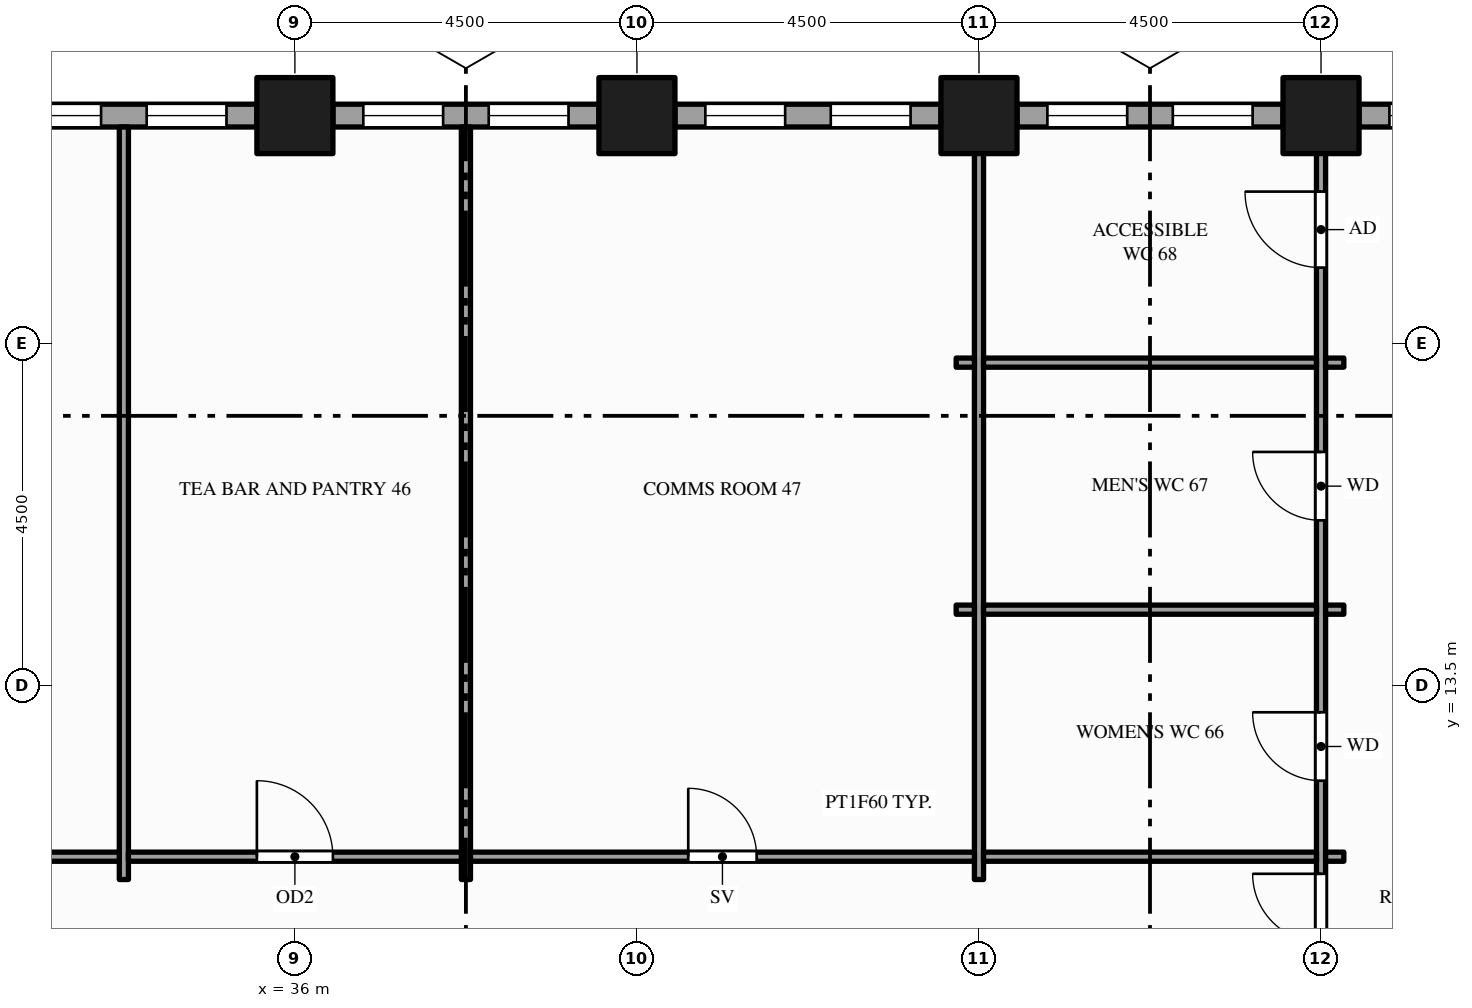
"""IFC4 building model, lengths in metres.
Left out: names, types, materials, properties, quantities, classifications, styles, units other than length and angle.
Written with IfcOpenShell. Run it as: python <this file> out.ifc"""

import sys

from ifc_helpers import new_model, si_unit, direction, frame, frame_2d, origin, origin_2d, place, context, subcontext, project, spatial, rectangle, hollow_rectangle, extrude, element, fill, save


model = new_model("IFC4")
c1 = context("Model", 3, precision=1e-05, world=origin(), true_north=direction((0.0, 1.0)))
c2 = subcontext(c1, "Body", "Model", "MODEL_VIEW")
j1 = project(units=[si_unit("LENGTHUNIT", "METRE"), si_unit("PLANEANGLEUNIT", "RADIAN")], contexts=[c1])
p1 = place(None, origin())
s1 = spatial("IfcSite", under=j1, at=p1, CompositionType="ELEMENT")
p2 = place(p1, origin())
s2 = spatial("IfcBuilding", under=s1, at=p2, CompositionType="ELEMENT")
p3 = place(p2, frame((0.0, 0.0, 95.0)))
s3 = spatial("IfcBuildingStorey", under=s2, at=p3, CompositionType="ELEMENT", Elevation=95.0)
for number, where, z_axis, x_axis in (
    (1, (36.0, 21.0, -0.15), (0.0, 0.0, 1.0), (1.0, 0.0, 0.0)),
    (2, (40.5, 21.0, -0.15), (0.0, 0.0, 1.0), (1.0, 0.0, 0.0)),
    (3, (45.0, 21.0, -0.15), (0.0, 0.0, 1.0), (1.0, 0.0, 0.0)),
    (4, (49.5, 21.0, -0.15), (0.0, 0.0, 1.0), (1.0, 0.0, 0.0)),
):
    element("IfcColumn", number, at=place(p3, frame(where, z_axis=z_axis, x_axis=x_axis)), inside=s3, PredefinedType="COLUMN", context=c2, shape_type="SweptSolid", body=[
        extrude(hollow_rectangle(XDim=1.0, YDim=1.0, WallThickness=0.05, at=origin_2d()), origin(), (0.0, 0.0, 1.0), 4.0),
    ])
p4 = place(p3, frame((54.0, 21.0, 0.0), z_axis=(0.0, 0.0, 1.0), x_axis=(-1.0, 0.0, 0.0)))
e5 = element("IfcWall", 5, at=p4, inside=s3, PredefinedType="STANDARD", context=c2, shape_type="SweptSolid", body=[
    extrude(rectangle(XDim=4.0, YDim=0.3, at=frame_2d((2.0, 0.0))), origin(), (0.0, 0.0, 1.0), 3.154),
])
p5 = place(p4, frame((0.4, 0.0, 0.9)))
e6 = element("IfcOpeningElement", 6, at=p5, cuts=e5, PredefinedType="OPENING", context=c2, shape_type="SweptSolid", body=[
    extrude(rectangle(XDim=1.55, YDim=2.0, at=frame_2d((0.775, 1.0))), frame((0.0, 0.16, 0.0), z_axis=(0.0, -1.0, 0.0), x_axis=(1.0, 0.0, 0.0)), (0.0, 0.0, 1.0), 0.32),
])
p6 = place(p4, frame((2.55, 0.0, 0.9)))
e7 = element("IfcOpeningElement", 7, at=p6, cuts=e5, PredefinedType="OPENING", context=c2, shape_type="SweptSolid", body=[
    extrude(rectangle(XDim=1.05, YDim=2.0, at=frame_2d((0.525, 1.0))), frame((0.0, 0.16, 0.0), z_axis=(0.0, -1.0, 0.0), x_axis=(1.0, 0.0, 0.0)), (0.0, 0.0, 1.0), 0.32),
])
p7 = place(p3, frame((49.0, 21.0, 0.0), z_axis=(0.0, 0.0, 1.0), x_axis=(-1.0, 0.0, 0.0)))
e8 = element("IfcWall", 8, at=p7, inside=s3, PredefinedType="STANDARD", context=c2, shape_type="SweptSolid", body=[
    extrude(rectangle(XDim=3.5, YDim=0.3, at=frame_2d((1.75, 0.0))), origin(), (0.0, 0.0, 1.0), 3.154),
])
p8 = place(p7, frame((0.4, 0.0, 0.9)))
e9 = element("IfcOpeningElement", 9, at=p8, cuts=e8, PredefinedType="OPENING", context=c2, shape_type="SweptSolid", body=[
    extrude(rectangle(XDim=1.05, YDim=2.0, at=frame_2d((0.525, 1.0))), frame((0.0, 0.16, 0.0), z_axis=(0.0, -1.0, 0.0), x_axis=(1.0, 0.0, 0.0)), (0.0, 0.0, 1.0), 0.32),
])
p9 = place(p7, frame((2.05, 0.0, 0.9)))
e10 = element("IfcOpeningElement", 10, at=p9, cuts=e8, PredefinedType="OPENING", context=c2, shape_type="SweptSolid", body=[
    extrude(rectangle(XDim=1.05, YDim=2.0, at=frame_2d((0.525, 1.0))), frame((0.0, 0.16, 0.0), z_axis=(0.0, -1.0, 0.0), x_axis=(1.0, 0.0, 0.0)), (0.0, 0.0, 1.0), 0.32),
])
p10 = place(p3, frame((44.5, 21.0, 0.0), z_axis=(0.0, 0.0, 1.0), x_axis=(-1.0, 0.0, 0.0)))
e11 = element("IfcWall", 11, at=p10, inside=s3, PredefinedType="STANDARD", context=c2, shape_type="SweptSolid", body=[
    extrude(rectangle(XDim=3.5, YDim=0.3, at=frame_2d((1.75, 0.0))), origin(), (0.0, 0.0, 1.0), 3.154),
])
p11 = place(p10, frame((0.4, 0.0, 0.9)))
e12 = element("IfcOpeningElement", 12, at=p11, cuts=e11, PredefinedType="OPENING", context=c2, shape_type="SweptSolid", body=[
    extrude(rectangle(XDim=1.05, YDim=2.0, at=frame_2d((0.525, 1.0))), frame((0.0, 0.16, 0.0), z_axis=(0.0, -1.0, 0.0), x_axis=(1.0, 0.0, 0.0)), (0.0, 0.0, 1.0), 0.32),
])
p12 = place(p10, frame((2.05, 0.0, 0.9)))
e13 = element("IfcOpeningElement", 13, at=p12, cuts=e11, PredefinedType="OPENING", context=c2, shape_type="SweptSolid", body=[
    extrude(rectangle(XDim=1.05, YDim=2.0, at=frame_2d((0.525, 1.0))), frame((0.0, 0.16, 0.0), z_axis=(0.0, -1.0, 0.0), x_axis=(1.0, 0.0, 0.0)), (0.0, 0.0, 1.0), 0.32),
])
p13 = place(p3, frame((40.0, 21.0, 0.0), z_axis=(0.0, 0.0, 1.0), x_axis=(-1.0, 0.0, 0.0)))
e14 = element("IfcWall", 14, at=p13, inside=s3, PredefinedType="STANDARD", context=c2, shape_type="SweptSolid", body=[
    extrude(rectangle(XDim=3.5, YDim=0.3, at=frame_2d((1.75, 0.0))), origin(), (0.0, 0.0, 1.0), 3.154),
])
p14 = place(p13, frame((0.4, 0.0, 0.9)))
e15 = element("IfcOpeningElement", 15, at=p14, cuts=e14, PredefinedType="OPENING", context=c2, shape_type="SweptSolid", body=[
    extrude(rectangle(XDim=1.05, YDim=2.0, at=frame_2d((0.525, 1.0))), frame((0.0, 0.16, 0.0), z_axis=(0.0, -1.0, 0.0), x_axis=(1.0, 0.0, 0.0)), (0.0, 0.0, 1.0), 0.32),
])
p15 = place(p13, frame((2.05, 0.0, 0.9)))
e16 = element("IfcOpeningElement", 16, at=p15, cuts=e14, PredefinedType="OPENING", context=c2, shape_type="SweptSolid", body=[
    extrude(rectangle(XDim=1.05, YDim=2.0, at=frame_2d((0.525, 1.0))), frame((0.0, 0.16, 0.0), z_axis=(0.0, -1.0, 0.0), x_axis=(1.0, 0.0, 0.0)), (0.0, 0.0, 1.0), 0.32),
])
p16 = place(p3, frame((35.5, 21.0, 0.0), z_axis=(0.0, 0.0, 1.0), x_axis=(-1.0, 0.0, 0.0)))
e17 = element("IfcWall", 17, at=p16, inside=s3, PredefinedType="STANDARD", context=c2, shape_type="SweptSolid", body=[
    extrude(rectangle(XDim=3.5, YDim=0.3, at=frame_2d((1.75, 0.0))), origin(), (0.0, 0.0, 1.0), 3.154),
])
p17 = place(p16, frame((0.4, 0.0, 0.9)))
e18 = element("IfcOpeningElement", 18, at=p17, cuts=e17, PredefinedType="OPENING", context=c2, shape_type="SweptSolid", body=[
    extrude(rectangle(XDim=1.05, YDim=2.0, at=frame_2d((0.525, 1.0))), frame((0.0, 0.16, 0.0), z_axis=(0.0, -1.0, 0.0), x_axis=(1.0, 0.0, 0.0)), (0.0, 0.0, 1.0), 0.32),
])
p18 = place(p16, frame((2.05, 0.0, 0.9)))
e19 = element("IfcOpeningElement", 19, at=p18, cuts=e17, PredefinedType="OPENING", context=c2, shape_type="SweptSolid", body=[
    extrude(rectangle(XDim=1.05, YDim=2.0, at=frame_2d((0.525, 1.0))), frame((0.0, 0.16, 0.0), z_axis=(0.0, -1.0, 0.0), x_axis=(1.0, 0.0, 0.0)), (0.0, 0.0, 1.0), 0.32),
])
for number, where, z_axis, x_axis in (
    (20, (33.75, 10.95, 0.0), (0.0, 0.0, 1.0), (0.0, 1.0, 0.0)),
    (21, (38.25, 10.95, 0.0), (0.0, 0.0, 1.0), (0.0, 1.0, 0.0)),
    (22, (45.0, 10.95, 0.0), (0.0, 0.0, 1.0), (0.0, 1.0, 0.0)),
):
    element("IfcWall", number, at=place(p3, frame(where, z_axis=z_axis, x_axis=x_axis)), inside=s3, PredefinedType="PARTITIONING", context=c2, shape_type="SweptSolid", body=[
        extrude(rectangle(XDim=9.9, YDim=0.12, at=frame_2d((4.95, 0.0))), origin(), (0.0, 0.0, 1.0), 2.938),
    ])
p19 = place(p3, frame((49.5, -1.35, 0.0), z_axis=(0.0, 0.0, 1.0), x_axis=(0.0, 1.0, 0.0)))
e23 = element("IfcWall", 23, at=p19, inside=s3, PredefinedType="PARTITIONING", context=c2, shape_type="SweptSolid", body=[
    extrude(rectangle(XDim=22.2, YDim=0.12, at=frame_2d((11.1, 0.0))), origin(), (0.0, 0.0, 1.0), 2.938),
])
p20 = place(p19, frame((10.575, 0.0, 0.0)))
e24 = element("IfcOpeningElement", 24, at=p20, cuts=e23, PredefinedType="OPENING", context=c2, shape_type="SweptSolid", body=[
    extrude(rectangle(XDim=1.8, YDim=2.1, at=frame_2d((0.9, 1.05))), frame((0.0, 0.07, 0.0), z_axis=(0.0, -1.0, 0.0), x_axis=(1.0, 0.0, 0.0)), (0.0, 0.0, 1.0), 0.14),
])
p21 = place(p19, frame((13.6, 0.0, 0.0)))
e25 = element("IfcOpeningElement", 25, at=p21, cuts=e23, PredefinedType="OPENING", context=c2, shape_type="SweptSolid", body=[
    extrude(rectangle(XDim=0.9, YDim=2.1, at=frame_2d((0.45, 1.05))), frame((0.0, 0.07, 0.0), z_axis=(0.0, -1.0, 0.0), x_axis=(1.0, 0.0, 0.0)), (0.0, 0.0, 1.0), 0.14),
])
p22 = place(p19, frame((17.025, 0.0, 0.0)))
e26 = element("IfcOpeningElement", 26, at=p22, cuts=e23, PredefinedType="OPENING", context=c2, shape_type="SweptSolid", body=[
    extrude(rectangle(XDim=0.9, YDim=2.1, at=frame_2d((0.45, 1.05))), frame((0.0, 0.07, 0.0), z_axis=(0.0, -1.0, 0.0), x_axis=(1.0, 0.0, 0.0)), (0.0, 0.0, 1.0), 0.14),
])
p23 = place(p19, frame((20.35, 0.0, 0.0)))
e27 = element("IfcOpeningElement", 27, at=p23, cuts=e23, PredefinedType="OPENING", context=c2, shape_type="SweptSolid", body=[
    extrude(rectangle(XDim=1.0, YDim=2.1, at=frame_2d((0.5, 1.05))), frame((0.0, 0.07, 0.0), z_axis=(0.0, -1.0, 0.0), x_axis=(1.0, 0.0, 0.0)), (0.0, 0.0, 1.0), 0.14),
])
p24 = place(p3, frame((29.31, 11.25, 0.0), z_axis=(0.0, 0.0, 1.0), x_axis=(1.0, 0.0, 0.0)))
e28 = element("IfcWall", 28, at=p24, inside=s3, PredefinedType="PARTITIONING", context=c2, shape_type="SweptSolid", body=[
    extrude(rectangle(XDim=4.38, YDim=0.12, at=frame_2d((2.19, 0.0))), origin(), (0.0, 0.0, 1.0), 2.938),
])
p25 = place(p24, frame((1.69, 0.0, 0.0)))
e29 = element("IfcOpeningElement", 29, at=p25, cuts=e28, PredefinedType="OPENING", context=c2, shape_type="SweptSolid", body=[
    extrude(rectangle(XDim=1.0, YDim=2.1, at=frame_2d((0.5, 1.05))), frame((0.0, 0.07, 0.0), z_axis=(0.0, -1.0, 0.0), x_axis=(1.0, 0.0, 0.0)), (0.0, 0.0, 1.0), 0.14),
])
p26 = place(p3, frame((33.81, 11.25, 0.0), z_axis=(0.0, 0.0, 1.0), x_axis=(1.0, 0.0, 0.0)))
e30 = element("IfcWall", 30, at=p26, inside=s3, PredefinedType="PARTITIONING", context=c2, shape_type="SweptSolid", body=[
    extrude(rectangle(XDim=4.38, YDim=0.12, at=frame_2d((2.19, 0.0))), origin(), (0.0, 0.0, 1.0), 2.938),
])
p27 = place(p26, frame((1.69, 0.0, 0.0)))
e31 = element("IfcOpeningElement", 31, at=p27, cuts=e30, PredefinedType="OPENING", context=c2, shape_type="SweptSolid", body=[
    extrude(rectangle(XDim=1.0, YDim=2.1, at=frame_2d((0.5, 1.05))), frame((0.0, 0.07, 0.0), z_axis=(0.0, -1.0, 0.0), x_axis=(1.0, 0.0, 0.0)), (0.0, 0.0, 1.0), 0.14),
])
p28 = place(p3, frame((38.31, 11.25, 0.0), z_axis=(0.0, 0.0, 1.0), x_axis=(1.0, 0.0, 0.0)))
e32 = element("IfcWall", 32, at=p28, inside=s3, PredefinedType="PARTITIONING", context=c2, shape_type="SweptSolid", body=[
    extrude(rectangle(XDim=6.63, YDim=0.12, at=frame_2d((3.315, 0.0))), origin(), (0.0, 0.0, 1.0), 2.938),
])
p29 = place(p28, frame((2.865, 0.0, 0.0)))
e33 = element("IfcOpeningElement", 33, at=p29, cuts=e32, PredefinedType="OPENING", context=c2, shape_type="SweptSolid", body=[
    extrude(rectangle(XDim=0.9, YDim=2.1, at=frame_2d((0.45, 1.05))), frame((0.0, 0.07, 0.0), z_axis=(0.0, -1.0, 0.0), x_axis=(1.0, 0.0, 0.0)), (0.0, 0.0, 1.0), 0.14),
])
p30 = place(p3, frame((45.06, 11.25, 0.0), z_axis=(0.0, 0.0, 1.0), x_axis=(1.0, 0.0, 0.0)))
e34 = element("IfcWall", 34, at=p30, inside=s3, PredefinedType="PARTITIONING", context=c2, shape_type="SweptSolid", body=[
    extrude(rectangle(XDim=4.38, YDim=0.12, at=frame_2d((2.19, 0.0))), origin(), (0.0, 0.0, 1.0), 2.938),
])
for number, where, z_axis, x_axis in (
    (35, (49.56, 11.25, 0.0), (0.0, 0.0, 1.0), (1.0, 0.0, 0.0)),
    (36, (44.7, 14.5, 0.0), (0.0, 0.0, 1.0), (1.0, 0.0, 0.0)),
):
    element("IfcWall", number, at=place(p3, frame(where, z_axis=z_axis, x_axis=x_axis)), inside=s3, PredefinedType="PARTITIONING", context=c2, shape_type="SweptSolid", body=[
        extrude(rectangle(XDim=0.24, YDim=0.12, at=frame_2d((0.12, 0.0))), origin(), (0.0, 0.0, 1.0), 2.938),
    ])
p31 = place(p3, frame((45.06, 14.5, 0.0), z_axis=(0.0, 0.0, 1.0), x_axis=(1.0, 0.0, 0.0)))
e37 = element("IfcWall", 37, at=p31, inside=s3, PredefinedType="PARTITIONING", context=c2, shape_type="SweptSolid", body=[
    extrude(rectangle(XDim=4.38, YDim=0.12, at=frame_2d((2.19, 0.0))), origin(), (0.0, 0.0, 1.0), 2.938),
])
for number, where, z_axis, x_axis in (
    (38, (49.56, 14.5, 0.0), (0.0, 0.0, 1.0), (1.0, 0.0, 0.0)),
    (39, (44.7, 17.75, 0.0), (0.0, 0.0, 1.0), (1.0, 0.0, 0.0)),
):
    element("IfcWall", number, at=place(p3, frame(where, z_axis=z_axis, x_axis=x_axis)), inside=s3, PredefinedType="PARTITIONING", context=c2, shape_type="SweptSolid", body=[
        extrude(rectangle(XDim=0.24, YDim=0.12, at=frame_2d((0.12, 0.0))), origin(), (0.0, 0.0, 1.0), 2.938),
    ])
p32 = place(p3, frame((45.06, 17.75, 0.0), z_axis=(0.0, 0.0, 1.0), x_axis=(1.0, 0.0, 0.0)))
e40 = element("IfcWall", 40, at=p32, inside=s3, PredefinedType="PARTITIONING", context=c2, shape_type="SweptSolid", body=[
    extrude(rectangle(XDim=4.38, YDim=0.12, at=frame_2d((2.19, 0.0))), origin(), (0.0, 0.0, 1.0), 2.938),
])
p33 = place(p3, frame((49.56, 17.75, 0.0), z_axis=(0.0, 0.0, 1.0), x_axis=(1.0, 0.0, 0.0)))
e41 = element("IfcWall", 41, at=p33, inside=s3, PredefinedType="PARTITIONING", context=c2, shape_type="SweptSolid", body=[
    extrude(rectangle(XDim=0.24, YDim=0.12, at=frame_2d((0.12, 0.0))), origin(), (0.0, 0.0, 1.0), 2.938),
])
p34 = place(p6, origin())
e42 = element("IfcWindow", 42, at=p34, inside=s3, PartitioningType="SINGLE_PANEL", PredefinedType="WINDOW", context=c2, shape_type="SweptSolid", body=[
    extrude(rectangle(XDim=1.05, YDim=2.0, at=frame_2d((0.525, 1.0))), frame((0.0, 0.03, 0.0), z_axis=(0.0, -1.0, 0.0), x_axis=(1.0, 0.0, 0.0)), (0.0, 0.0, 1.0), 0.06),
])
fill(e7, e42)
p35 = place(p8, origin())
e43 = element("IfcWindow", 43, at=p35, inside=s3, PartitioningType="SINGLE_PANEL", PredefinedType="WINDOW", context=c2, shape_type="SweptSolid", body=[
    extrude(rectangle(XDim=1.05, YDim=2.0, at=frame_2d((0.525, 1.0))), frame((0.0, 0.03, 0.0), z_axis=(0.0, -1.0, 0.0), x_axis=(1.0, 0.0, 0.0)), (0.0, 0.0, 1.0), 0.06),
])
fill(e9, e43)
p36 = place(p9, origin())
e44 = element("IfcWindow", 44, at=p36, inside=s3, PartitioningType="SINGLE_PANEL", PredefinedType="WINDOW", context=c2, shape_type="SweptSolid", body=[
    extrude(rectangle(XDim=1.05, YDim=2.0, at=frame_2d((0.525, 1.0))), frame((0.0, 0.03, 0.0), z_axis=(0.0, -1.0, 0.0), x_axis=(1.0, 0.0, 0.0)), (0.0, 0.0, 1.0), 0.06),
])
fill(e10, e44)
p37 = place(p11, origin())
e45 = element("IfcWindow", 45, at=p37, inside=s3, PartitioningType="SINGLE_PANEL", PredefinedType="WINDOW", context=c2, shape_type="SweptSolid", body=[
    extrude(rectangle(XDim=1.05, YDim=2.0, at=frame_2d((0.525, 1.0))), frame((0.0, 0.03, 0.0), z_axis=(0.0, -1.0, 0.0), x_axis=(1.0, 0.0, 0.0)), (0.0, 0.0, 1.0), 0.06),
])
fill(e12, e45)
p38 = place(p12, origin())
e46 = element("IfcWindow", 46, at=p38, inside=s3, PartitioningType="SINGLE_PANEL", PredefinedType="WINDOW", context=c2, shape_type="SweptSolid", body=[
    extrude(rectangle(XDim=1.05, YDim=2.0, at=frame_2d((0.525, 1.0))), frame((0.0, 0.03, 0.0), z_axis=(0.0, -1.0, 0.0), x_axis=(1.0, 0.0, 0.0)), (0.0, 0.0, 1.0), 0.06),
])
fill(e13, e46)
p39 = place(p14, origin())
e47 = element("IfcWindow", 47, at=p39, inside=s3, PartitioningType="SINGLE_PANEL", PredefinedType="WINDOW", context=c2, shape_type="SweptSolid", body=[
    extrude(rectangle(XDim=1.05, YDim=2.0, at=frame_2d((0.525, 1.0))), frame((0.0, 0.03, 0.0), z_axis=(0.0, -1.0, 0.0), x_axis=(1.0, 0.0, 0.0)), (0.0, 0.0, 1.0), 0.06),
])
fill(e15, e47)
p40 = place(p15, origin())
e48 = element("IfcWindow", 48, at=p40, inside=s3, PartitioningType="SINGLE_PANEL", PredefinedType="WINDOW", context=c2, shape_type="SweptSolid", body=[
    extrude(rectangle(XDim=1.05, YDim=2.0, at=frame_2d((0.525, 1.0))), frame((0.0, 0.03, 0.0), z_axis=(0.0, -1.0, 0.0), x_axis=(1.0, 0.0, 0.0)), (0.0, 0.0, 1.0), 0.06),
])
fill(e16, e48)
p41 = place(p17, origin())
e49 = element("IfcWindow", 49, at=p41, inside=s3, PartitioningType="SINGLE_PANEL", PredefinedType="WINDOW", context=c2, shape_type="SweptSolid", body=[
    extrude(rectangle(XDim=1.05, YDim=2.0, at=frame_2d((0.525, 1.0))), frame((0.0, 0.03, 0.0), z_axis=(0.0, -1.0, 0.0), x_axis=(1.0, 0.0, 0.0)), (0.0, 0.0, 1.0), 0.06),
])
fill(e18, e49)
p42 = place(p18, origin())
e50 = element("IfcWindow", 50, at=p42, inside=s3, PartitioningType="SINGLE_PANEL", PredefinedType="WINDOW", context=c2, shape_type="SweptSolid", body=[
    extrude(rectangle(XDim=1.05, YDim=2.0, at=frame_2d((0.525, 1.0))), frame((0.0, 0.03, 0.0), z_axis=(0.0, -1.0, 0.0), x_axis=(1.0, 0.0, 0.0)), (0.0, 0.0, 1.0), 0.06),
])
fill(e19, e50)
p43 = place(p20, origin())
e51 = element("IfcDoor", 51, at=p43, inside=s3, OperationType="DOUBLE_DOOR_SINGLE_SWING", PredefinedType="DOOR", context=c2, shape_type="SweptSolid", body=[
    extrude(rectangle(XDim=1.8, YDim=2.1, at=frame_2d((0.9, 1.05))), frame((0.0, 0.025, 0.0), z_axis=(0.0, -1.0, 0.0), x_axis=(1.0, 0.0, 0.0)), (0.0, 0.0, 1.0), 0.05),
])
fill(e24, e51)
p44 = place(p27, origin())
e52 = element("IfcDoor", 52, at=p44, inside=s3, OperationType="SINGLE_SWING_LEFT", PredefinedType="DOOR", context=c2, shape_type="SweptSolid", body=[
    extrude(rectangle(XDim=1.0, YDim=2.1, at=frame_2d((0.5, 1.05))), frame((0.0, 0.025, 0.0), z_axis=(0.0, -1.0, 0.0), x_axis=(1.0, 0.0, 0.0)), (0.0, 0.0, 1.0), 0.05),
])
fill(e31, e52)
p45 = place(p29, origin())
e53 = element("IfcDoor", 53, at=p45, inside=s3, OperationType="SINGLE_SWING_LEFT", PredefinedType="DOOR", context=c2, shape_type="SweptSolid", body=[
    extrude(rectangle(XDim=0.9, YDim=2.1, at=frame_2d((0.45, 1.05))), frame((0.0, 0.025, 0.0), z_axis=(0.0, -1.0, 0.0), x_axis=(1.0, 0.0, 0.0)), (0.0, 0.0, 1.0), 0.05),
])
fill(e33, e53)
p46 = place(p21, origin())
e54 = element("IfcDoor", 54, at=p46, inside=s3, OperationType="SINGLE_SWING_RIGHT", PredefinedType="DOOR", context=c2, shape_type="SweptSolid", body=[
    extrude(rectangle(XDim=0.9, YDim=2.1, at=frame_2d((0.45, 1.05))), frame((0.0, 0.025, 0.0), z_axis=(0.0, -1.0, 0.0), x_axis=(1.0, 0.0, 0.0)), (0.0, 0.0, 1.0), 0.05),
])
fill(e25, e54)
p47 = place(p22, origin())
e55 = element("IfcDoor", 55, at=p47, inside=s3, OperationType="SINGLE_SWING_RIGHT", PredefinedType="DOOR", context=c2, shape_type="SweptSolid", body=[
    extrude(rectangle(XDim=0.9, YDim=2.1, at=frame_2d((0.45, 1.05))), frame((0.0, 0.025, 0.0), z_axis=(0.0, -1.0, 0.0), x_axis=(1.0, 0.0, 0.0)), (0.0, 0.0, 1.0), 0.05),
])
fill(e26, e55)
p48 = place(p23, origin())
e56 = element("IfcDoor", 56, at=p48, inside=s3, OperationType="SINGLE_SWING_RIGHT", PredefinedType="DOOR", context=c2, shape_type="SweptSolid", body=[
    extrude(rectangle(XDim=1.0, YDim=2.1, at=frame_2d((0.5, 1.05))), frame((0.0, 0.025, 0.0), z_axis=(0.0, -1.0, 0.0), x_axis=(1.0, 0.0, 0.0)), (0.0, 0.0, 1.0), 0.05),
])
fill(e27, e56)
save(model, sys.argv[1])
